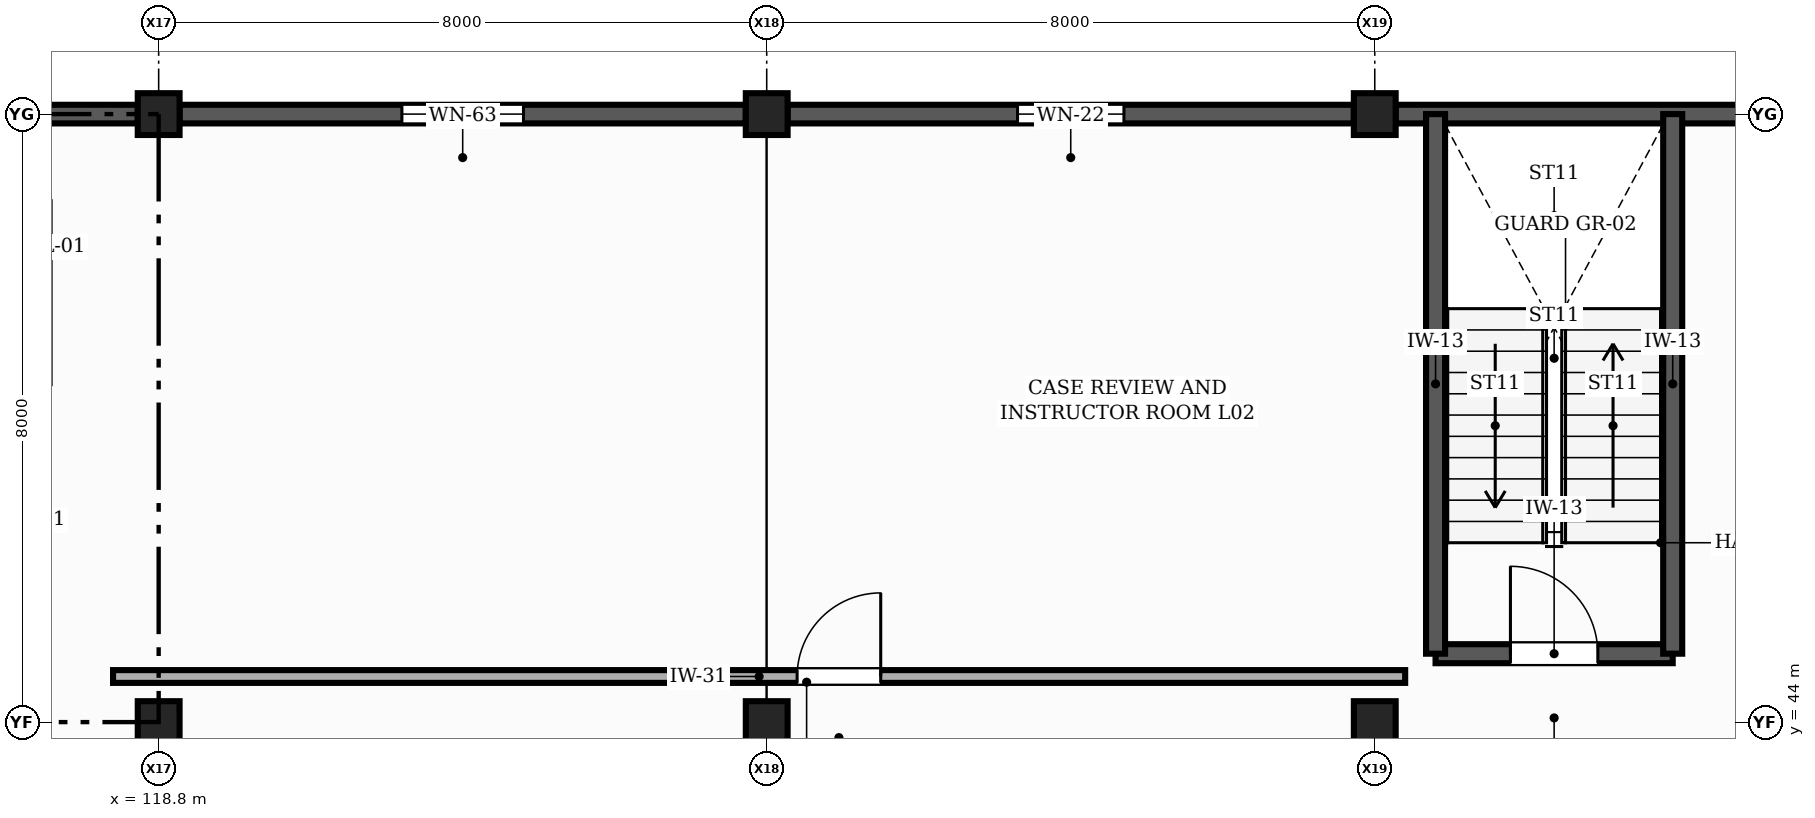
"""IFC4 building model, lengths in metres.
Left out: names, types, materials, properties, quantities, classifications, styles, units other than length and angle.
Written with IfcOpenShell. Run it as: python <this file> out.ifc"""

import sys

from ifc_helpers import new_model, si_unit, direction, frame, frame_2d, origin, origin_2d, place, context, subcontext, project, spatial, rectangle, extrude, element, fill, save


model = new_model("IFC4")
c1 = context("Model", 3, precision=1e-05, world=origin(), true_north=direction((0.0, 1.0)))
c2 = subcontext(c1, "Body", "Model", "MODEL_VIEW")
j1 = project(units=[si_unit("LENGTHUNIT", "METRE"), si_unit("PLANEANGLEUNIT", "RADIAN")], contexts=[c1])
p1 = place(None, origin())
s1 = spatial("IfcSite", under=j1, at=p1, CompositionType="ELEMENT")
p2 = place(p1, origin())
s2 = spatial("IfcBuilding", under=s1, at=p2, CompositionType="ELEMENT")
p3 = place(p2, frame((0.0, 0.0, 9.0)))
s3 = spatial("IfcBuildingStorey", under=s2, at=p3, CompositionType="ELEMENT", Elevation=9.0)
for number, where, z_axis, x_axis in (
    (1, (118.8, 44.0, 0.0), (0.0, 0.0, 1.0), (1.0, 0.0, 0.0)),
    (2, (118.8, 52.0, 0.0), (0.0, 0.0, 1.0), (1.0, 0.0, 0.0)),
    (3, (126.8, 44.0, 0.0), (0.0, 0.0, 1.0), (1.0, 0.0, 0.0)),
    (4, (126.8, 52.0, 0.0), (0.0, 0.0, 1.0), (1.0, 0.0, 0.0)),
    (5, (134.8, 44.0, 0.0), (0.0, 0.0, 1.0), (1.0, 0.0, 0.0)),
    (6, (134.8, 52.0, 0.0), (0.0, 0.0, 1.0), (1.0, 0.0, 0.0)),
):
    element("IfcColumn", number, at=place(p3, frame(where, z_axis=z_axis, x_axis=x_axis)), inside=s3, PredefinedType="COLUMN", context=c2, shape_type="SweptSolid", body=[
        extrude(rectangle(XDim=0.55, YDim=0.55, at=origin_2d()), origin(), (0.0, 0.0, 1.0), 4.5),
    ])
p4 = place(p3, frame((142.525, 52.0, 0.0), z_axis=(0.0, 0.0, 1.0), x_axis=(-1.0, 0.0, 0.0)))
e7 = element("IfcWall", 7, at=p4, inside=s3, PredefinedType="SOLIDWALL", context=c2, shape_type="SweptSolid", body=[
    extrude(rectangle(XDim=7.45, YDim=0.245, at=frame_2d((3.725, 0.0))), origin(), (0.0, 0.0, 1.0), 4.22),
])
p5 = place(p3, frame((134.525, 52.0, 0.0), z_axis=(0.0, 0.0, 1.0), x_axis=(-1.0, 0.0, 0.0)))
e8 = element("IfcWall", 8, at=p5, inside=s3, PredefinedType="SOLIDWALL", context=c2, shape_type="SweptSolid", body=[
    extrude(rectangle(XDim=7.45, YDim=0.245, at=frame_2d((3.725, 0.0))), origin(), (0.0, 0.0, 1.0), 3.57),
])
p6 = place(p5, frame((3.025, 0.0, 0.9)))
e9 = element("IfcOpeningElement", 9, at=p6, cuts=e8, PredefinedType="OPENING", context=c2, shape_type="SweptSolid", body=[
    extrude(rectangle(XDim=1.4, YDim=1.4, at=frame_2d((0.7, 0.7))), frame((0.0, 0.133, 0.0), z_axis=(0.0, -1.0, 0.0), x_axis=(1.0, 0.0, 0.0)), (0.0, 0.0, 1.0), 0.265),
])
p7 = place(p3, frame((126.525, 52.0, 0.0), z_axis=(0.0, 0.0, 1.0), x_axis=(-1.0, 0.0, 0.0)))
e10 = element("IfcWall", 10, at=p7, inside=s3, PredefinedType="SOLIDWALL", context=c2, shape_type="SweptSolid", body=[
    extrude(rectangle(XDim=7.45, YDim=0.245, at=frame_2d((3.725, 0.0))), origin(), (0.0, 0.0, 1.0), 3.57),
])
p8 = place(p7, frame((2.925, 0.0, 0.9)))
e11 = element("IfcOpeningElement", 11, at=p8, cuts=e10, PredefinedType="OPENING", context=c2, shape_type="SweptSolid", body=[
    extrude(rectangle(XDim=1.6, YDim=1.25, at=frame_2d((0.8, 0.625))), frame((0.0, 0.133, 0.0), z_axis=(0.0, -1.0, 0.0), x_axis=(1.0, 0.0, 0.0)), (0.0, 0.0, 1.0), 0.265),
])
p9 = place(p3, frame((118.525, 52.0, 0.0), z_axis=(0.0, 0.0, 1.0), x_axis=(-1.0, 0.0, 0.0)))
e12 = element("IfcWall", 12, at=p9, inside=s3, PredefinedType="SOLIDWALL", context=c2, shape_type="SweptSolid", body=[
    extrude(rectangle(XDim=7.45, YDim=0.245, at=frame_2d((3.725, 0.0))), origin(), (0.0, 0.0, 1.0), 4.22),
])
p10 = place(p3, frame((135.6, 44.9, 0.0), z_axis=(0.0, 0.0, 1.0), x_axis=(1.0, 0.0, 0.0)))
e13 = element("IfcWall", 13, at=p10, inside=s3, PredefinedType="SHEAR", context=c2, shape_type="SweptSolid", body=[
    extrude(rectangle(XDim=3.12, YDim=0.25, at=frame_2d((1.56, 0.0))), origin(), (0.0, 0.0, 1.0), 4.5),
])
p11 = place(p10, frame((0.985, 0.0, 0.0)))
e14 = element("IfcOpeningElement", 14, at=p11, cuts=e13, PredefinedType="OPENING", context=c2, shape_type="SweptSolid", body=[
    extrude(rectangle(XDim=1.15, YDim=2.15, at=frame_2d((0.575, 1.075))), frame((0.0, 0.135, 0.0), z_axis=(0.0, -1.0, 0.0), x_axis=(1.0, 0.0, 0.0)), (0.0, 0.0, 1.0), 0.27),
])
for number, where, z_axis, x_axis in (
    (15, (138.72, 44.9, 0.0), (0.0, 0.0, 1.0), (0.0, 1.0, 0.0)),
    (16, (135.6, 52.0, 0.0), (0.0, 0.0, 1.0), (0.0, -1.0, 0.0)),
):
    element("IfcWall", number, at=place(p3, frame(where, z_axis=z_axis, x_axis=x_axis)), inside=s3, PredefinedType="SHEAR", context=c2, shape_type="SweptSolid", body=[
        extrude(rectangle(XDim=7.1, YDim=0.25, at=frame_2d((3.55, 0.0))), origin(), (0.0, 0.0, 1.0), 4.5),
    ])
p12 = place(p3, frame((118.2, 44.6, 0.0), z_axis=(0.0, 0.0, 1.0), x_axis=(1.0, 0.0, 0.0)))
e17 = element("IfcWall", 17, at=p12, inside=s3, PredefinedType="PARTITIONING", context=c2, shape_type="SweptSolid", body=[
    extrude(rectangle(XDim=17.0, YDim=0.168, at=frame_2d((8.5, 0.0))), origin(), (0.0, 0.0, 1.0), 3.655),
])
p13 = place(p12, frame((9.0, 0.0, 0.0)))
e18 = element("IfcOpeningElement", 18, at=p13, cuts=e17, PredefinedType="OPENING", context=c2, shape_type="SweptSolid", body=[
    extrude(rectangle(XDim=1.1, YDim=2.1, at=frame_2d((0.55, 1.05))), frame((0.0, 0.094, 0.0), z_axis=(0.0, -1.0, 0.0), x_axis=(1.0, 0.0, 0.0)), (0.0, 0.0, 1.0), 0.188),
])
p14 = place(p6, origin())
e19 = element("IfcWindow", 19, at=p14, inside=s3, PartitioningType="SINGLE_PANEL", PredefinedType="WINDOW", context=c2, shape_type="SweptSolid", body=[
    extrude(rectangle(XDim=1.4, YDim=1.4, at=frame_2d((0.7, 0.7))), frame((0.0, 0.03, 0.0), z_axis=(0.0, -1.0, 0.0), x_axis=(1.0, 0.0, 0.0)), (0.0, 0.0, 1.0), 0.06),
])
fill(e9, e19)
p15 = place(p8, origin())
e20 = element("IfcWindow", 20, at=p15, inside=s3, PartitioningType="SINGLE_PANEL", PredefinedType="WINDOW", context=c2, shape_type="SweptSolid", body=[
    extrude(rectangle(XDim=1.6, YDim=1.25, at=frame_2d((0.8, 0.625))), frame((0.0, 0.03, 0.0), z_axis=(0.0, -1.0, 0.0), x_axis=(1.0, 0.0, 0.0)), (0.0, 0.0, 1.0), 0.06),
])
fill(e11, e20)
p16 = place(p11, origin())
e21 = element("IfcDoor", 21, at=p16, inside=s3, OperationType="SINGLE_SWING_LEFT", PredefinedType="DOOR", context=c2, shape_type="SweptSolid", body=[
    extrude(rectangle(XDim=1.15, YDim=2.15, at=frame_2d((0.575, 1.075))), frame((0.0, 0.025, 0.0), z_axis=(0.0, -1.0, 0.0), x_axis=(1.0, 0.0, 0.0)), (0.0, 0.0, 1.0), 0.05),
])
fill(e14, e21)
p17 = place(p13, origin())
e22 = element("IfcDoor", 22, at=p17, inside=s3, OperationType="SINGLE_SWING_RIGHT", PredefinedType="DOOR", context=c2, shape_type="SweptSolid", body=[
    extrude(rectangle(XDim=1.1, YDim=2.1, at=frame_2d((0.55, 1.05))), frame((0.0, 0.025, 0.0), z_axis=(0.0, -1.0, 0.0), x_axis=(1.0, 0.0, 0.0)), (0.0, 0.0, 1.0), 0.05),
])
fill(e18, e22)
save(model, sys.argv[1])
